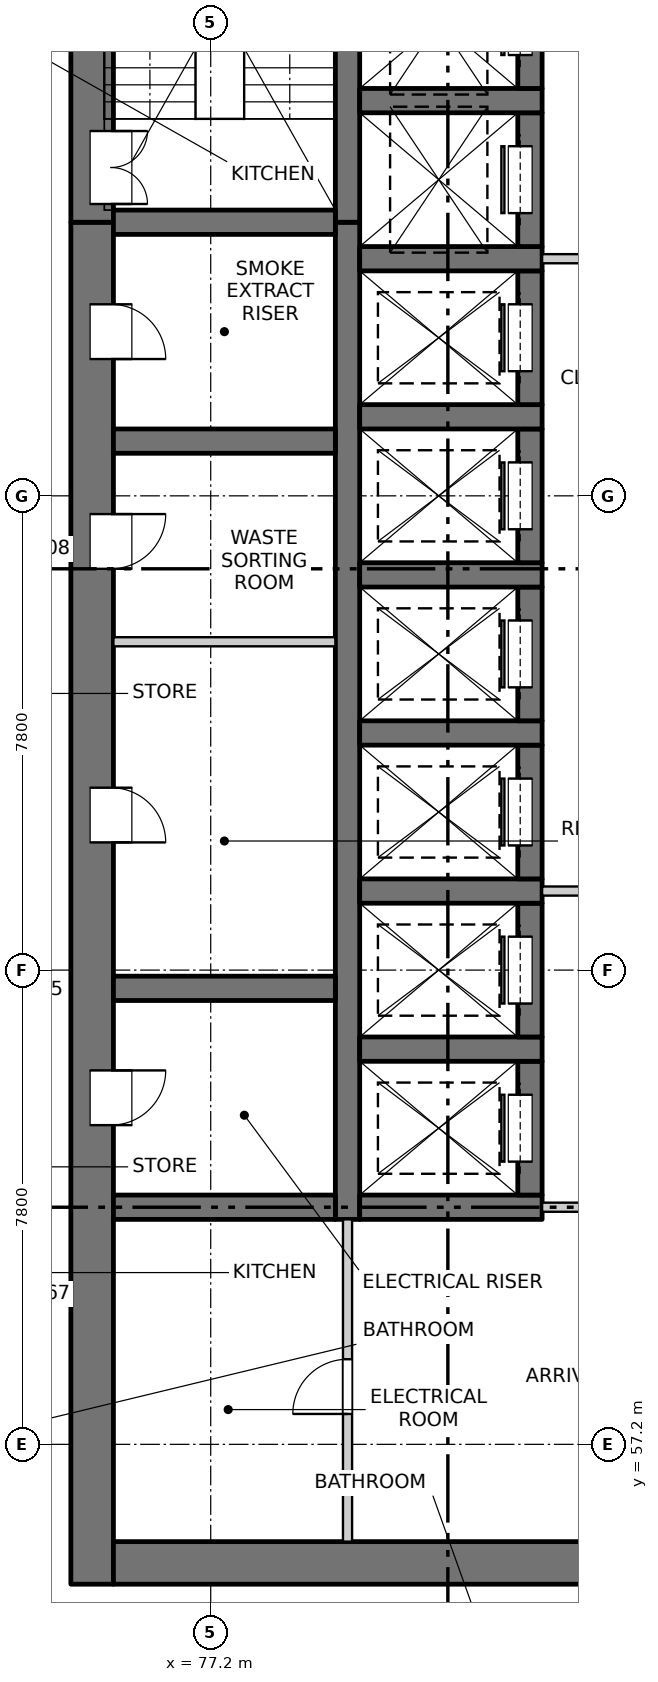
"""IFC4 building model, lengths in metres.
Left out: names, types, materials, properties, quantities, classifications, styles, units other than length and angle.
Written with IfcOpenShell. Run it as: python <this file> out.ifc"""

import sys

from ifc_helpers import new_model, si_unit, direction, frame, frame_2d, origin, place, context, subcontext, project, spatial, rectangle, extrude, element, fill, save


model = new_model("IFC4")
c1 = context("Model", 3, precision=1e-05, world=origin(), true_north=direction((0.0, 1.0)))
c2 = subcontext(c1, "Body", "Model", "MODEL_VIEW")
j1 = project(units=[si_unit("LENGTHUNIT", "METRE"), si_unit("PLANEANGLEUNIT", "RADIAN")], contexts=[c1])
p1 = place(None, origin())
s1 = spatial("IfcSite", under=j1, at=p1, CompositionType="ELEMENT")
p2 = place(p1, origin())
s2 = spatial("IfcBuilding", under=s1, at=p2, CompositionType="ELEMENT")
p3 = place(p2, frame((0.0, 0.0, 43.3)))
s3 = spatial("IfcBuildingStorey", under=s2, at=p3, CompositionType="ELEMENT", Elevation=43.3)
p4 = place(p3, frame((75.25, 54.9, -0.25), z_axis=(0.0, 0.0, 1.0), x_axis=(0.0, 1.0, 0.0)))
e1 = element("IfcWall", 1, at=p4, inside=s3, PredefinedType="SOLIDWALL", context=c2, shape_type="SweptSolid", body=[
    extrude(rectangle(XDim=22.4, YDim=0.7, at=frame_2d((11.2, 0.0))), origin(), (0.0, 0.0, 1.0), 3.35),
])
p5 = place(p4, frame((7.55, 0.0, 0.25)))
e2 = element("IfcOpeningElement", 2, at=p5, cuts=e1, PredefinedType="OPENING", context=c2, shape_type="SweptSolid", body=[
    extrude(rectangle(XDim=0.9, YDim=2.1, at=frame_2d((0.45, 1.05))), frame((0.0, 0.36, 0.0), z_axis=(0.0, -1.0, 0.0), x_axis=(1.0, 0.0, 0.0)), (0.0, 0.0, 1.0), 0.72),
])
p6 = place(p4, frame((12.2, 0.0, 0.25)))
e3 = element("IfcOpeningElement", 3, at=p6, cuts=e1, PredefinedType="OPENING", context=c2, shape_type="SweptSolid", body=[
    extrude(rectangle(XDim=0.9, YDim=2.1, at=frame_2d((0.45, 1.05))), frame((0.0, 0.36, 0.0), z_axis=(0.0, -1.0, 0.0), x_axis=(1.0, 0.0, 0.0)), (0.0, 0.0, 1.0), 0.72),
])
p7 = place(p4, frame((16.7, 0.0, 0.25)))
e4 = element("IfcOpeningElement", 4, at=p7, cuts=e1, PredefinedType="OPENING", context=c2, shape_type="SweptSolid", body=[
    extrude(rectangle(XDim=0.9, YDim=2.1, at=frame_2d((0.45, 1.05))), frame((0.0, 0.36, 0.0), z_axis=(0.0, -1.0, 0.0), x_axis=(1.0, 0.0, 0.0)), (0.0, 0.0, 1.0), 0.72),
])
p8 = place(p4, frame((20.15, 0.0, 0.25)))
e5 = element("IfcOpeningElement", 5, at=p8, cuts=e1, PredefinedType="OPENING", context=c2, shape_type="SweptSolid", body=[
    extrude(rectangle(XDim=0.9, YDim=2.1, at=frame_2d((0.45, 1.05))), frame((0.0, 0.36, 0.0), z_axis=(0.0, -1.0, 0.0), x_axis=(1.0, 0.0, 0.0)), (0.0, 0.0, 1.0), 0.72),
])
p9 = place(p3, frame((75.25, 77.3, -0.25), z_axis=(0.0, 0.0, 1.0), x_axis=(0.0, 1.0, 0.0)))
e6 = element("IfcWall", 6, at=p9, inside=s3, PredefinedType="SOLIDWALL", context=c2, shape_type="SweptSolid", body=[
    extrude(rectangle(XDim=7.55, YDim=0.7, at=frame_2d((3.775, 0.0))), origin(), (0.0, 0.0, 1.0), 3.35),
])
p10 = place(p9, frame((0.3, 0.0, 0.25)))
e7 = element("IfcOpeningElement", 7, at=p10, cuts=e6, PredefinedType="OPENING", context=c2, shape_type="SweptSolid", body=[
    extrude(rectangle(XDim=1.2, YDim=2.1, at=frame_2d((0.6, 1.05))), frame((0.0, 0.36, 0.0), z_axis=(0.0, -1.0, 0.0), x_axis=(1.0, 0.0, 0.0)), (0.0, 0.0, 1.0), 0.72),
])
p11 = place(p3, frame((75.6, 55.25, -0.25), z_axis=(0.0, 0.0, 1.0), x_axis=(1.0, 0.0, 0.0)))
e8 = element("IfcWall", 8, at=p11, inside=s3, PredefinedType="SOLIDWALL", context=c2, shape_type="SweptSolid", body=[
    extrude(rectangle(XDim=18.8, YDim=0.7, at=frame_2d((9.4, 0.0))), origin(), (0.0, 0.0, 1.0), 3.35),
])
p12 = place(p11, frame((8.65, 0.0, 0.25)))
e9 = element("IfcOpeningElement", 9, at=p12, cuts=e8, PredefinedType="OPENING", context=c2, shape_type="SweptSolid", body=[
    extrude(rectangle(XDim=1.5, YDim=2.1, at=frame_2d((0.75, 1.05))), frame((0.0, 0.36, 0.0), z_axis=(0.0, -1.0, 0.0), x_axis=(1.0, 0.0, 0.0)), (0.0, 0.0, 1.0), 0.72),
])
p13 = place(p3, frame((79.45, 60.9, -0.25), z_axis=(0.0, 0.0, 1.0), x_axis=(0.0, 1.0, 0.0)))
e10 = element("IfcWall", 10, at=p13, inside=s3, PredefinedType="SOLIDWALL", context=c2, shape_type="SweptSolid", body=[
    extrude(rectangle(XDim=16.4, YDim=0.4, at=frame_2d((8.2, 0.0))), origin(), (0.0, 0.0, 1.0), 3.35),
])
p14 = place(p3, frame((79.45, 77.3, -0.25), z_axis=(0.0, 0.0, 1.0), x_axis=(0.0, 1.0, 0.0)))
e11 = element("IfcWall", 11, at=p14, inside=s3, PredefinedType="SOLIDWALL", context=c2, shape_type="SweptSolid", body=[
    extrude(rectangle(XDim=6.85, YDim=0.4, at=frame_2d((3.425, 0.0))), origin(), (0.0, 0.0, 1.0), 3.35),
])
p15 = place(p3, frame((79.65, 61.1, -0.25), z_axis=(0.0, 0.0, 1.0), x_axis=(1.0, 0.0, 0.0)))
e12 = element("IfcWall", 12, at=p15, inside=s3, PredefinedType="SOLIDWALL", context=c2, shape_type="SweptSolid", body=[
    extrude(rectangle(XDim=3.0, YDim=0.4, at=frame_2d((1.5, 0.0))), origin(), (0.0, 0.0, 1.0), 3.35),
])
p16 = place(p3, frame((82.45, 61.3, -0.25), z_axis=(0.0, 0.0, 1.0), x_axis=(0.0, 1.0, 0.0)))
e13 = element("IfcWall", 13, at=p16, inside=s3, PredefinedType="SOLIDWALL", context=c2, shape_type="SweptSolid", body=[
    extrude(rectangle(XDim=2.2, YDim=0.4, at=frame_2d((1.1, 0.0))), origin(), (0.0, 0.0, 1.0), 3.35),
])
p17 = place(p16, frame((0.55, 0.0, 0.25)))
e14 = element("IfcOpeningElement", 14, at=p17, cuts=e13, PredefinedType="OPENING", context=c2, shape_type="SweptSolid", body=[
    extrude(rectangle(XDim=1.1, YDim=2.1, at=frame_2d((0.55, 1.05))), frame((0.0, 0.21, 0.0), z_axis=(0.0, -1.0, 0.0), x_axis=(1.0, 0.0, 0.0)), (0.0, 0.0, 1.0), 0.42),
])
p18 = place(p3, frame((79.65, 63.7, -0.25), z_axis=(0.0, 0.0, 1.0), x_axis=(1.0, 0.0, 0.0)))
e15 = element("IfcWall", 15, at=p18, inside=s3, PredefinedType="SOLIDWALL", context=c2, shape_type="SweptSolid", body=[
    extrude(rectangle(XDim=3.0, YDim=0.4, at=frame_2d((1.5, 0.0))), origin(), (0.0, 0.0, 1.0), 3.35),
])
p19 = place(p3, frame((82.45, 63.9, -0.25), z_axis=(0.0, 0.0, 1.0), x_axis=(0.0, 1.0, 0.0)))
e16 = element("IfcWall", 16, at=p19, inside=s3, PredefinedType="SOLIDWALL", context=c2, shape_type="SweptSolid", body=[
    extrude(rectangle(XDim=2.2, YDim=0.4, at=frame_2d((1.1, 0.0))), origin(), (0.0, 0.0, 1.0), 3.35),
])
p20 = place(p19, frame((0.55, 0.0, 0.25)))
e17 = element("IfcOpeningElement", 17, at=p20, cuts=e16, PredefinedType="OPENING", context=c2, shape_type="SweptSolid", body=[
    extrude(rectangle(XDim=1.1, YDim=2.1, at=frame_2d((0.55, 1.05))), frame((0.0, 0.21, 0.0), z_axis=(0.0, -1.0, 0.0), x_axis=(1.0, 0.0, 0.0)), (0.0, 0.0, 1.0), 0.42),
])
p21 = place(p3, frame((79.65, 66.3, -0.25), z_axis=(0.0, 0.0, 1.0), x_axis=(1.0, 0.0, 0.0)))
e18 = element("IfcWall", 18, at=p21, inside=s3, PredefinedType="SOLIDWALL", context=c2, shape_type="SweptSolid", body=[
    extrude(rectangle(XDim=3.0, YDim=0.4, at=frame_2d((1.5, 0.0))), origin(), (0.0, 0.0, 1.0), 3.35),
])
p22 = place(p3, frame((82.45, 66.5, -0.25), z_axis=(0.0, 0.0, 1.0), x_axis=(0.0, 1.0, 0.0)))
e19 = element("IfcWall", 19, at=p22, inside=s3, PredefinedType="SOLIDWALL", context=c2, shape_type="SweptSolid", body=[
    extrude(rectangle(XDim=2.2, YDim=0.4, at=frame_2d((1.1, 0.0))), origin(), (0.0, 0.0, 1.0), 3.35),
])
p23 = place(p22, frame((0.55, 0.0, 0.25)))
e20 = element("IfcOpeningElement", 20, at=p23, cuts=e19, PredefinedType="OPENING", context=c2, shape_type="SweptSolid", body=[
    extrude(rectangle(XDim=1.1, YDim=2.1, at=frame_2d((0.55, 1.05))), frame((0.0, 0.21, 0.0), z_axis=(0.0, -1.0, 0.0), x_axis=(1.0, 0.0, 0.0)), (0.0, 0.0, 1.0), 0.42),
])
p24 = place(p3, frame((79.65, 68.9, -0.25), z_axis=(0.0, 0.0, 1.0), x_axis=(1.0, 0.0, 0.0)))
e21 = element("IfcWall", 21, at=p24, inside=s3, PredefinedType="SOLIDWALL", context=c2, shape_type="SweptSolid", body=[
    extrude(rectangle(XDim=3.0, YDim=0.4, at=frame_2d((1.5, 0.0))), origin(), (0.0, 0.0, 1.0), 3.35),
])
p25 = place(p3, frame((82.45, 69.1, -0.25), z_axis=(0.0, 0.0, 1.0), x_axis=(0.0, 1.0, 0.0)))
e22 = element("IfcWall", 22, at=p25, inside=s3, PredefinedType="SOLIDWALL", context=c2, shape_type="SweptSolid", body=[
    extrude(rectangle(XDim=2.2, YDim=0.4, at=frame_2d((1.1, 0.0))), origin(), (0.0, 0.0, 1.0), 3.35),
])
p26 = place(p25, frame((0.55, 0.0, 0.25)))
e23 = element("IfcOpeningElement", 23, at=p26, cuts=e22, PredefinedType="OPENING", context=c2, shape_type="SweptSolid", body=[
    extrude(rectangle(XDim=1.1, YDim=2.1, at=frame_2d((0.55, 1.05))), frame((0.0, 0.21, 0.0), z_axis=(0.0, -1.0, 0.0), x_axis=(1.0, 0.0, 0.0)), (0.0, 0.0, 1.0), 0.42),
])
p27 = place(p3, frame((79.65, 71.5, -0.25), z_axis=(0.0, 0.0, 1.0), x_axis=(1.0, 0.0, 0.0)))
e24 = element("IfcWall", 24, at=p27, inside=s3, PredefinedType="SOLIDWALL", context=c2, shape_type="SweptSolid", body=[
    extrude(rectangle(XDim=3.0, YDim=0.4, at=frame_2d((1.5, 0.0))), origin(), (0.0, 0.0, 1.0), 3.35),
])
p28 = place(p3, frame((82.45, 71.7, -0.25), z_axis=(0.0, 0.0, 1.0), x_axis=(0.0, 1.0, 0.0)))
e25 = element("IfcWall", 25, at=p28, inside=s3, PredefinedType="SOLIDWALL", context=c2, shape_type="SweptSolid", body=[
    extrude(rectangle(XDim=2.2, YDim=0.4, at=frame_2d((1.1, 0.0))), origin(), (0.0, 0.0, 1.0), 3.35),
])
p29 = place(p28, frame((0.55, 0.0, 0.25)))
e26 = element("IfcOpeningElement", 26, at=p29, cuts=e25, PredefinedType="OPENING", context=c2, shape_type="SweptSolid", body=[
    extrude(rectangle(XDim=1.1, YDim=2.1, at=frame_2d((0.55, 1.05))), frame((0.0, 0.21, 0.0), z_axis=(0.0, -1.0, 0.0), x_axis=(1.0, 0.0, 0.0)), (0.0, 0.0, 1.0), 0.42),
])
p30 = place(p3, frame((79.65, 74.1, -0.25), z_axis=(0.0, 0.0, 1.0), x_axis=(1.0, 0.0, 0.0)))
e27 = element("IfcWall", 27, at=p30, inside=s3, PredefinedType="SOLIDWALL", context=c2, shape_type="SweptSolid", body=[
    extrude(rectangle(XDim=3.0, YDim=0.4, at=frame_2d((1.5, 0.0))), origin(), (0.0, 0.0, 1.0), 3.35),
])
p31 = place(p3, frame((82.45, 74.3, -0.25), z_axis=(0.0, 0.0, 1.0), x_axis=(0.0, 1.0, 0.0)))
e28 = element("IfcWall", 28, at=p31, inside=s3, PredefinedType="SOLIDWALL", context=c2, shape_type="SweptSolid", body=[
    extrude(rectangle(XDim=2.2, YDim=0.4, at=frame_2d((1.1, 0.0))), origin(), (0.0, 0.0, 1.0), 3.35),
])
p32 = place(p31, frame((0.55, 0.0, 0.25)))
e29 = element("IfcOpeningElement", 29, at=p32, cuts=e28, PredefinedType="OPENING", context=c2, shape_type="SweptSolid", body=[
    extrude(rectangle(XDim=1.1, YDim=2.1, at=frame_2d((0.55, 1.05))), frame((0.0, 0.21, 0.0), z_axis=(0.0, -1.0, 0.0), x_axis=(1.0, 0.0, 0.0)), (0.0, 0.0, 1.0), 0.42),
])
p33 = place(p3, frame((79.65, 76.7, -0.25), z_axis=(0.0, 0.0, 1.0), x_axis=(1.0, 0.0, 0.0)))
e30 = element("IfcWall", 30, at=p33, inside=s3, PredefinedType="SOLIDWALL", context=c2, shape_type="SweptSolid", body=[
    extrude(rectangle(XDim=3.0, YDim=0.4, at=frame_2d((1.5, 0.0))), origin(), (0.0, 0.0, 1.0), 3.35),
])
p34 = place(p3, frame((82.45, 76.9, -0.25), z_axis=(0.0, 0.0, 1.0), x_axis=(0.0, 1.0, 0.0)))
e31 = element("IfcWall", 31, at=p34, inside=s3, PredefinedType="SOLIDWALL", context=c2, shape_type="SweptSolid", body=[
    extrude(rectangle(XDim=2.2, YDim=0.4, at=frame_2d((1.1, 0.0))), origin(), (0.0, 0.0, 1.0), 3.35),
])
p35 = place(p34, frame((0.55, 0.0, 0.25)))
e32 = element("IfcOpeningElement", 32, at=p35, cuts=e31, PredefinedType="OPENING", context=c2, shape_type="SweptSolid", body=[
    extrude(rectangle(XDim=1.1, YDim=2.1, at=frame_2d((0.55, 1.05))), frame((0.0, 0.21, 0.0), z_axis=(0.0, -1.0, 0.0), x_axis=(1.0, 0.0, 0.0)), (0.0, 0.0, 1.0), 0.42),
])
p36 = place(p3, frame((79.65, 79.3, -0.25), z_axis=(0.0, 0.0, 1.0), x_axis=(1.0, 0.0, 0.0)))
e33 = element("IfcWall", 33, at=p36, inside=s3, PredefinedType="SOLIDWALL", context=c2, shape_type="SweptSolid", body=[
    extrude(rectangle(XDim=3.0, YDim=0.4, at=frame_2d((1.5, 0.0))), origin(), (0.0, 0.0, 1.0), 3.35),
])
p37 = place(p3, frame((82.45, 79.5, -0.25), z_axis=(0.0, 0.0, 1.0), x_axis=(0.0, 1.0, 0.0)))
e34 = element("IfcWall", 34, at=p37, inside=s3, PredefinedType="SOLIDWALL", context=c2, shape_type="SweptSolid", body=[
    extrude(rectangle(XDim=2.2, YDim=0.4, at=frame_2d((1.1, 0.0))), origin(), (0.0, 0.0, 1.0), 3.35),
])
p38 = place(p37, frame((0.55, 0.0, 0.25)))
e35 = element("IfcOpeningElement", 35, at=p38, cuts=e34, PredefinedType="OPENING", context=c2, shape_type="SweptSolid", body=[
    extrude(rectangle(XDim=1.1, YDim=2.1, at=frame_2d((0.55, 1.05))), frame((0.0, 0.21, 0.0), z_axis=(0.0, -1.0, 0.0), x_axis=(1.0, 0.0, 0.0)), (0.0, 0.0, 1.0), 0.42),
])
for number, where, z_axis, x_axis in (
    (36, (75.6, 61.1, -0.25), (0.0, 0.0, 1.0), (1.0, 0.0, 0.0)),
    (37, (75.6, 64.7, -0.25), (0.0, 0.0, 1.0), (1.0, 0.0, 0.0)),
    (38, (75.6, 73.7, -0.25), (0.0, 0.0, 1.0), (1.0, 0.0, 0.0)),
    (39, (75.6, 77.3, -0.25), (0.0, 0.0, 1.0), (1.0, 0.0, 0.0)),
):
    element("IfcWall", number, at=place(p3, frame(where, z_axis=z_axis, x_axis=x_axis)), inside=s3, PredefinedType="SOLIDWALL", context=c2, shape_type="SweptSolid", body=[
        extrude(rectangle(XDim=3.65, YDim=0.4, at=frame_2d((1.825, 0.0))), origin(), (0.0, 0.0, 1.0), 3.35),
    ])
p39 = place(p3, frame((82.65, 61.1, 0.0), z_axis=(0.0, 0.0, 1.0), x_axis=(1.0, 0.0, 0.0)))
e40 = element("IfcWall", 40, at=p39, inside=s3, PredefinedType="PARTITIONING", context=c2, shape_type="SweptSolid", body=[
    extrude(rectangle(XDim=4.7, YDim=0.15, at=frame_2d((2.35, 0.0))), origin(), (0.0, 0.0, 1.0), 3.1),
])
p40 = place(p39, frame((1.45, 0.0, 0.0)))
e41 = element("IfcOpeningElement", 41, at=p40, cuts=e40, PredefinedType="OPENING", context=c2, shape_type="SweptSolid", body=[
    extrude(rectangle(XDim=1.8, YDim=2.1, at=frame_2d((0.9, 1.05))), frame((0.0, 0.085, 0.0), z_axis=(0.0, -1.0, 0.0), x_axis=(1.0, 0.0, 0.0)), (0.0, 0.0, 1.0), 0.17),
])
p41 = place(p3, frame((82.65, 66.3, 0.0), z_axis=(0.0, 0.0, 1.0), x_axis=(1.0, 0.0, 0.0)))
e42 = element("IfcWall", 42, at=p41, inside=s3, PredefinedType="PARTITIONING", context=c2, shape_type="SweptSolid", body=[
    extrude(rectangle(XDim=4.7, YDim=0.15, at=frame_2d((2.35, 0.0))), origin(), (0.0, 0.0, 1.0), 3.1),
])
p42 = place(p41, frame((1.45, 0.0, 0.0)))
e43 = element("IfcOpeningElement", 43, at=p42, cuts=e42, PredefinedType="OPENING", context=c2, shape_type="SweptSolid", body=[
    extrude(rectangle(XDim=1.8, YDim=2.1, at=frame_2d((0.9, 1.05))), frame((0.0, 0.085, 0.0), z_axis=(0.0, -1.0, 0.0), x_axis=(1.0, 0.0, 0.0)), (0.0, 0.0, 1.0), 0.17),
])
p43 = place(p3, frame((75.6, 70.4, 0.0), z_axis=(0.0, 0.0, 1.0), x_axis=(1.0, 0.0, 0.0)))
e44 = element("IfcWall", 44, at=p43, inside=s3, PredefinedType="PARTITIONING", context=c2, shape_type="SweptSolid", body=[
    extrude(rectangle(XDim=3.65, YDim=0.15, at=frame_2d((1.825, 0.0))), origin(), (0.0, 0.0, 1.0), 3.1),
])
p44 = place(p3, frame((82.65, 76.7, 0.0), z_axis=(0.0, 0.0, 1.0), x_axis=(1.0, 0.0, 0.0)))
e45 = element("IfcWall", 45, at=p44, inside=s3, PredefinedType="PARTITIONING", context=c2, shape_type="SweptSolid", body=[
    extrude(rectangle(XDim=4.7, YDim=0.15, at=frame_2d((2.35, 0.0))), origin(), (0.0, 0.0, 1.0), 3.1),
])
p45 = place(p44, frame((1.45, 0.0, 0.0)))
e46 = element("IfcOpeningElement", 46, at=p45, cuts=e45, PredefinedType="OPENING", context=c2, shape_type="SweptSolid", body=[
    extrude(rectangle(XDim=1.8, YDim=2.1, at=frame_2d((0.9, 1.05))), frame((0.0, 0.085, 0.0), z_axis=(0.0, -1.0, 0.0), x_axis=(1.0, 0.0, 0.0)), (0.0, 0.0, 1.0), 0.17),
])
p46 = place(p3, frame((79.45, 55.6, 0.0), z_axis=(0.0, 0.0, 1.0), x_axis=(0.0, 1.0, 0.0)))
e47 = element("IfcWall", 47, at=p46, inside=s3, PredefinedType="PARTITIONING", context=c2, shape_type="SweptSolid", body=[
    extrude(rectangle(XDim=5.3, YDim=0.15, at=frame_2d((2.65, 0.0))), origin(), (0.0, 0.0, 1.0), 3.1),
])
p47 = place(p46, frame((2.1, 0.0, 0.0)))
e48 = element("IfcOpeningElement", 48, at=p47, cuts=e47, PredefinedType="OPENING", context=c2, shape_type="SweptSolid", body=[
    extrude(rectangle(XDim=0.9, YDim=2.1, at=frame_2d((0.45, 1.05))), frame((0.0, 0.085, 0.0), z_axis=(0.0, -1.0, 0.0), x_axis=(1.0, 0.0, 0.0)), (0.0, 0.0, 1.0), 0.17),
])
p48 = place(p47, origin())
e49 = element("IfcDoor", 49, at=p48, inside=s3, OperationType="SINGLE_SWING_LEFT", PredefinedType="DOOR", context=c2, shape_type="SweptSolid", body=[
    extrude(rectangle(XDim=0.9, YDim=2.1, at=frame_2d((0.45, 1.05))), frame((0.0, 0.025, 0.0), z_axis=(0.0, -1.0, 0.0), x_axis=(1.0, 0.0, 0.0)), (0.0, 0.0, 1.0), 0.05),
])
fill(e48, e49)
p49 = place(p17, origin())
e50 = element("IfcDoor", 50, at=p49, inside=s3, OperationType="SLIDING_TO_RIGHT", PredefinedType="DOOR", context=c2, shape_type="SweptSolid", body=[
    extrude(rectangle(XDim=1.1, YDim=2.1, at=frame_2d((0.55, 1.05))), frame((0.0, 0.185, 0.0), z_axis=(0.0, -1.0, 0.0), x_axis=(1.0, 0.0, 0.0)), (0.0, 0.0, 1.0), 0.05),
])
fill(e14, e50)
p50 = place(p5, origin())
e51 = element("IfcDoor", 51, at=p50, inside=s3, OperationType="SINGLE_SWING_LEFT", PredefinedType="DOOR", context=c2, shape_type="SweptSolid", body=[
    extrude(rectangle(XDim=0.9, YDim=2.1, at=frame_2d((0.45, 1.05))), frame((0.0, -0.285, 0.0), z_axis=(0.0, -1.0, 0.0), x_axis=(1.0, 0.0, 0.0)), (0.0, 0.0, 1.0), 0.05),
])
fill(e2, e51)
p51 = place(p20, origin())
e52 = element("IfcDoor", 52, at=p51, inside=s3, OperationType="SLIDING_TO_RIGHT", PredefinedType="DOOR", context=c2, shape_type="SweptSolid", body=[
    extrude(rectangle(XDim=1.1, YDim=2.1, at=frame_2d((0.55, 1.05))), frame((0.0, 0.185, 0.0), z_axis=(0.0, -1.0, 0.0), x_axis=(1.0, 0.0, 0.0)), (0.0, 0.0, 1.0), 0.05),
])
fill(e17, e52)
p52 = place(p6, origin())
e53 = element("IfcDoor", 53, at=p52, inside=s3, OperationType="SINGLE_SWING_RIGHT", PredefinedType="DOOR", context=c2, shape_type="SweptSolid", body=[
    extrude(rectangle(XDim=0.9, YDim=2.1, at=frame_2d((0.45, 1.05))), frame((0.0, -0.285, 0.0), z_axis=(0.0, -1.0, 0.0), x_axis=(1.0, 0.0, 0.0)), (0.0, 0.0, 1.0), 0.05),
])
fill(e3, e53)
p53 = place(p23, origin())
e54 = element("IfcDoor", 54, at=p53, inside=s3, OperationType="SLIDING_TO_RIGHT", PredefinedType="DOOR", context=c2, shape_type="SweptSolid", body=[
    extrude(rectangle(XDim=1.1, YDim=2.1, at=frame_2d((0.55, 1.05))), frame((0.0, 0.185, 0.0), z_axis=(0.0, -1.0, 0.0), x_axis=(1.0, 0.0, 0.0)), (0.0, 0.0, 1.0), 0.05),
])
fill(e20, e54)
p54 = place(p26, origin())
e55 = element("IfcDoor", 55, at=p54, inside=s3, OperationType="SLIDING_TO_LEFT", PredefinedType="DOOR", context=c2, shape_type="SweptSolid", body=[
    extrude(rectangle(XDim=1.1, YDim=2.1, at=frame_2d((0.55, 1.05))), frame((0.0, 0.185, 0.0), z_axis=(0.0, -1.0, 0.0), x_axis=(1.0, 0.0, 0.0)), (0.0, 0.0, 1.0), 0.05),
])
fill(e23, e55)
p55 = place(p7, origin())
e56 = element("IfcDoor", 56, at=p55, inside=s3, OperationType="SINGLE_SWING_LEFT", PredefinedType="DOOR", context=c2, shape_type="SweptSolid", body=[
    extrude(rectangle(XDim=0.9, YDim=2.1, at=frame_2d((0.45, 1.05))), frame((0.0, -0.285, 0.0), z_axis=(0.0, -1.0, 0.0), x_axis=(1.0, 0.0, 0.0)), (0.0, 0.0, 1.0), 0.05),
])
fill(e4, e56)
p56 = place(p29, origin())
e57 = element("IfcDoor", 57, at=p56, inside=s3, OperationType="SLIDING_TO_LEFT", PredefinedType="DOOR", context=c2, shape_type="SweptSolid", body=[
    extrude(rectangle(XDim=1.1, YDim=2.1, at=frame_2d((0.55, 1.05))), frame((0.0, 0.185, 0.0), z_axis=(0.0, -1.0, 0.0), x_axis=(1.0, 0.0, 0.0)), (0.0, 0.0, 1.0), 0.05),
])
fill(e26, e57)
p57 = place(p32, origin())
e58 = element("IfcDoor", 58, at=p57, inside=s3, OperationType="SLIDING_TO_LEFT", PredefinedType="DOOR", context=c2, shape_type="SweptSolid", body=[
    extrude(rectangle(XDim=1.1, YDim=2.1, at=frame_2d((0.55, 1.05))), frame((0.0, 0.185, 0.0), z_axis=(0.0, -1.0, 0.0), x_axis=(1.0, 0.0, 0.0)), (0.0, 0.0, 1.0), 0.05),
])
fill(e29, e58)
p58 = place(p8, origin())
e59 = element("IfcDoor", 59, at=p58, inside=s3, OperationType="SINGLE_SWING_RIGHT", PredefinedType="DOOR", context=c2, shape_type="SweptSolid", body=[
    extrude(rectangle(XDim=0.9, YDim=2.1, at=frame_2d((0.45, 1.05))), frame((0.0, -0.285, 0.0), z_axis=(0.0, -1.0, 0.0), x_axis=(1.0, 0.0, 0.0)), (0.0, 0.0, 1.0), 0.05),
])
fill(e5, e59)
p59 = place(p35, origin())
e60 = element("IfcDoor", 60, at=p59, inside=s3, OperationType="SLIDING_TO_LEFT", PredefinedType="DOOR", context=c2, shape_type="SweptSolid", body=[
    extrude(rectangle(XDim=1.1, YDim=2.1, at=frame_2d((0.55, 1.05))), frame((0.0, 0.185, 0.0), z_axis=(0.0, -1.0, 0.0), x_axis=(1.0, 0.0, 0.0)), (0.0, 0.0, 1.0), 0.05),
])
fill(e32, e60)
p60 = place(p10, origin())
e61 = element("IfcDoor", 61, at=p60, inside=s3, OperationType="DOUBLE_DOOR_SINGLE_SWING", PredefinedType="DOOR", context=c2, shape_type="SweptSolid", body=[
    extrude(rectangle(XDim=1.2, YDim=2.1, at=frame_2d((0.6, 1.05))), frame((0.0, -0.285, 0.0), z_axis=(0.0, -1.0, 0.0), x_axis=(1.0, 0.0, 0.0)), (0.0, 0.0, 1.0), 0.05),
])
fill(e7, e61)
p61 = place(p38, origin())
e62 = element("IfcDoor", 62, at=p61, inside=s3, OperationType="SLIDING_TO_LEFT", PredefinedType="DOOR", context=c2, shape_type="SweptSolid", body=[
    extrude(rectangle(XDim=1.1, YDim=2.1, at=frame_2d((0.55, 1.05))), frame((0.0, 0.185, 0.0), z_axis=(0.0, -1.0, 0.0), x_axis=(1.0, 0.0, 0.0)), (0.0, 0.0, 1.0), 0.05),
])
fill(e35, e62)
save(model, sys.argv[1])
